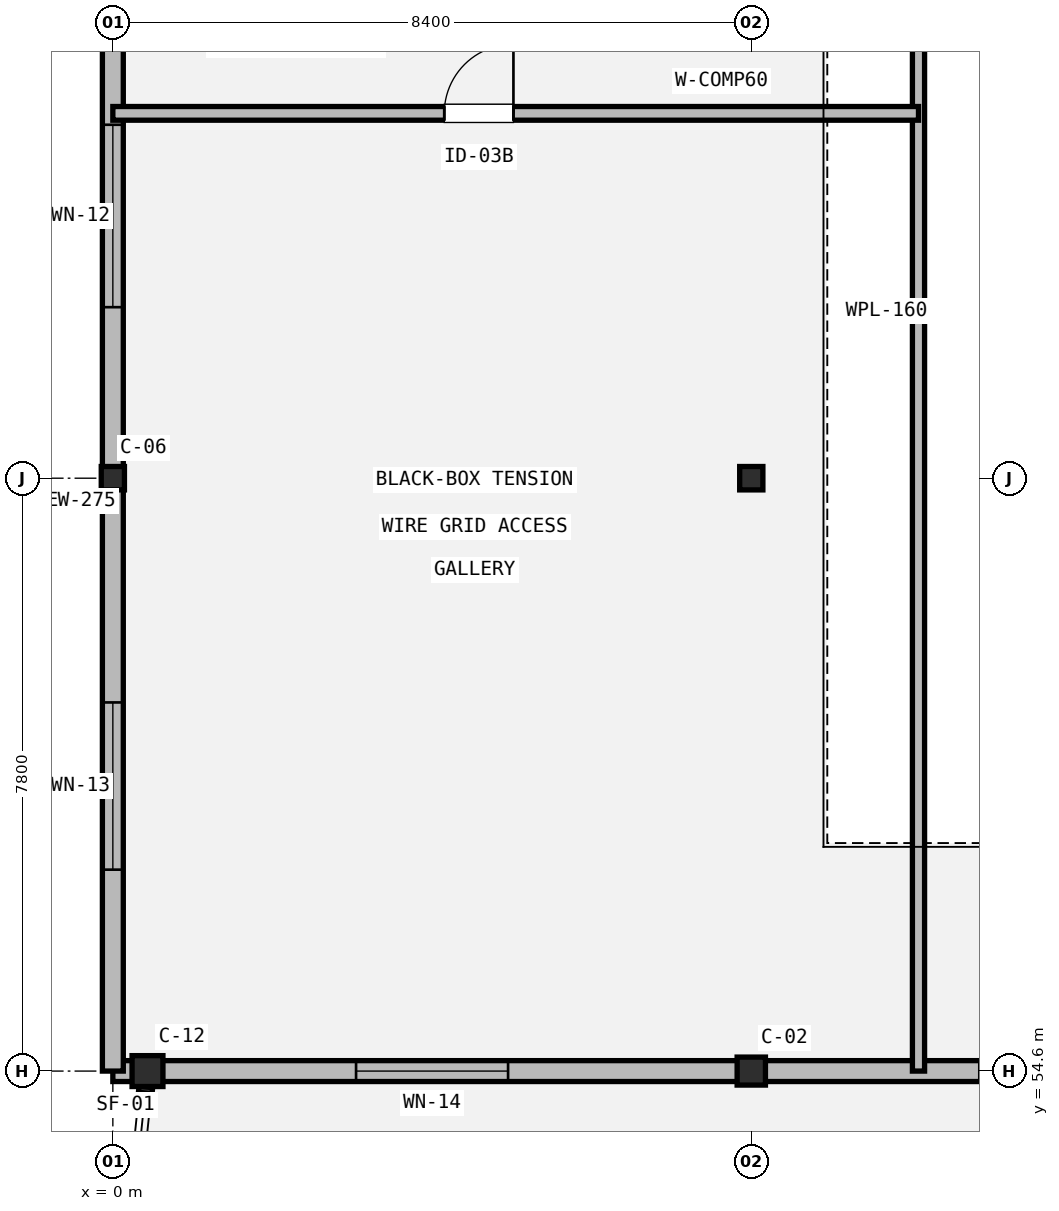
"""IFC4 building model, lengths in metres.
Left out: names, types, materials, properties, quantities, classifications, styles, units other than length and angle.
Written with IfcOpenShell. Run it as: python <this file> out.ifc"""

import sys

from ifc_helpers import new_model, si_unit, direction, frame, frame_2d, origin, origin_2d, place, context, subcontext, project, spatial, rectangle, hollow_circle, i_section, extrude, element, fill, save


model = new_model("IFC4")
c1 = context("Model", 3, precision=1e-05, world=origin(), true_north=direction((0.0, 1.0)))
c2 = subcontext(c1, "Body", "Model", "MODEL_VIEW")
j1 = project(units=[si_unit("LENGTHUNIT", "METRE"), si_unit("PLANEANGLEUNIT", "RADIAN")], contexts=[c1])
p1 = place(None, origin())
s1 = spatial("IfcSite", under=j1, at=p1, CompositionType="ELEMENT")
p2 = place(p1, origin())
s2 = spatial("IfcBuilding", under=s1, at=p2, CompositionType="ELEMENT")
p3 = place(p2, frame((0.0, 0.0, 10.2)))
s3 = spatial("IfcBuildingStorey", under=s2, at=p3, CompositionType="ELEMENT", Elevation=10.2)
p4 = place(p3, frame((8.4, 54.6, 0.0), z_axis=(0.0, 0.0, 1.0), x_axis=(1.0, 0.0, 0.0)))
e1 = element("IfcColumn", 1, at=p4, inside=s3, PredefinedType="COLUMN", context=c2, shape_type="SweptSolid", body=[
    extrude(i_section(OverallWidth=0.373, OverallDepth=0.368, WebThickness=0.014, FlangeThickness=0.024, FilletRadius=0.015, at=origin_2d()), origin(), (0.0, 0.0, 1.0), 4.8),
])
p5 = place(p3, frame((0.456, 54.6, 0.0), z_axis=(0.0, 0.0, 1.0), x_axis=(1.0, 0.0, 0.0)))
e2 = element("IfcColumn", 2, at=p5, inside=s3, PredefinedType="COLUMN", context=c2, shape_type="SweptSolid", body=[
    extrude(hollow_circle(Radius=0.203, WallThickness=0.016, at=origin_2d()), origin(), (0.0, 0.0, 1.0), 4.8),
])
for number, where, z_axis, x_axis in (
    (3, (0.0, 62.4, 0.0), (0.0, 0.0, 1.0), (1.0, 0.0, 0.0)),
    (4, (8.4, 62.4, 0.0), (0.0, 0.0, 1.0), (1.0, 0.0, 0.0)),
):
    element("IfcColumn", number, at=place(p3, frame(where, z_axis=z_axis, x_axis=x_axis)), inside=s3, PredefinedType="COLUMN", context=c2, shape_type="SweptSolid", body=[
        extrude(i_section(OverallWidth=0.305, OverallDepth=0.308, WebThickness=0.01, FlangeThickness=0.015, FilletRadius=0.015, at=origin_2d()), origin(), (0.0, 0.0, 1.0), 4.8),
    ])
p6 = place(p3, frame((25.2, 54.6, 0.0), z_axis=(0.0, 0.0, 1.0), x_axis=(-1.0, 0.0, 0.0)))
e5 = element("IfcWall", 5, at=p6, inside=s3, PredefinedType="STANDARD", context=c2, shape_type="SweptSolid", body=[
    extrude(rectangle(XDim=25.2, YDim=0.275, at=frame_2d((12.6, 0.0))), origin(), (0.0, 0.0, 1.0), 4.032),
])
p7 = place(p6, frame((3.075, 0.0, 0.9)))
e6 = element("IfcOpeningElement", 6, at=p7, cuts=e5, PredefinedType="OPENING", context=c2, shape_type="SweptSolid", body=[
    extrude(rectangle(XDim=0.9, YDim=1.35, at=frame_2d((0.45, 0.675))), frame((0.0, 0.147, 0.0), z_axis=(0.0, -1.0, 0.0), x_axis=(1.0, 0.0, 0.0)), (0.0, 0.0, 1.0), 0.295),
])
p8 = place(p6, frame((11.4, 0.0, 0.9)))
e7 = element("IfcOpeningElement", 7, at=p8, cuts=e5, PredefinedType="OPENING", context=c2, shape_type="SweptSolid", body=[
    extrude(rectangle(XDim=2.4, YDim=1.8, at=frame_2d((1.2, 0.9))), frame((0.0, 0.147, 0.0), z_axis=(0.0, -1.0, 0.0), x_axis=(1.0, 0.0, 0.0)), (0.0, 0.0, 1.0), 0.295),
])
p9 = place(p6, frame((20.0, 0.0, 0.9)))
e8 = element("IfcOpeningElement", 8, at=p9, cuts=e5, PredefinedType="OPENING", context=c2, shape_type="SweptSolid", body=[
    extrude(rectangle(XDim=2.0, YDim=1.1, at=frame_2d((1.0, 0.55))), frame((0.0, 0.147, 0.0), z_axis=(0.0, -1.0, 0.0), x_axis=(1.0, 0.0, 0.0)), (0.0, 0.0, 1.0), 0.295),
])
p10 = place(p3, frame((0.0, 54.6, 0.0), z_axis=(0.0, 0.0, 1.0), x_axis=(0.0, 1.0, 0.0)))
e9 = element("IfcWall", 9, at=p10, inside=s3, PredefinedType="STANDARD", context=c2, shape_type="SweptSolid", body=[
    extrude(rectangle(XDim=15.0, YDim=0.275, at=frame_2d((7.5, 0.0))), origin(), (0.0, 0.0, 1.0), 4.032),
])
p11 = place(p10, frame((2.65, 0.0, 0.9)))
e10 = element("IfcOpeningElement", 10, at=p11, cuts=e9, PredefinedType="OPENING", context=c2, shape_type="SweptSolid", body=[
    extrude(rectangle(XDim=2.2, YDim=1.15, at=frame_2d((1.1, 0.575))), frame((0.0, 0.147, 0.0), z_axis=(0.0, -1.0, 0.0), x_axis=(1.0, 0.0, 0.0)), (0.0, 0.0, 1.0), 0.295),
])
p12 = place(p10, frame((10.05, 0.0, 0.9)))
e11 = element("IfcOpeningElement", 11, at=p12, cuts=e9, PredefinedType="OPENING", context=c2, shape_type="SweptSolid", body=[
    extrude(rectangle(XDim=2.4, YDim=1.15, at=frame_2d((1.2, 0.575))), frame((0.0, 0.147, 0.0), z_axis=(0.0, -1.0, 0.0), x_axis=(1.0, 0.0, 0.0)), (0.0, 0.0, 1.0), 0.295),
])
p13 = place(p3, frame((10.6, 54.6, 0.0), z_axis=(0.0, 0.0, 1.0), x_axis=(0.0, 1.0, 0.0)))
e12 = element("IfcWall", 12, at=p13, inside=s3, PredefinedType="PLUMBINGWALL", context=c2, shape_type="SweptSolid", body=[
    extrude(rectangle(XDim=32.4, YDim=0.16, at=frame_2d((16.2, 0.0))), origin(), (0.0, 0.0, 1.0), 3.564),
])
p14 = place(p13, frame((25.502, 0.0, 0.0)))
e13 = element("IfcOpeningElement", 13, at=p14, cuts=e12, PredefinedType="OPENING", context=c2, shape_type="SweptSolid", body=[
    extrude(rectangle(XDim=1.3, YDim=2.2, at=frame_2d((0.65, 1.1))), frame((0.0, 0.09, 0.0), z_axis=(0.0, -1.0, 0.0), x_axis=(1.0, 0.0, 0.0)), (0.0, 0.0, 1.0), 0.18),
])
p15 = place(p3, frame((0.0, 67.2, 0.0), z_axis=(0.0, 0.0, 1.0), x_axis=(1.0, 0.0, 0.0)))
e14 = element("IfcWall", 14, at=p15, inside=s3, PredefinedType="STANDARD", context=c2, shape_type="SweptSolid", body=[
    extrude(rectangle(XDim=10.6, YDim=0.18, at=frame_2d((5.3, 0.0))), origin(), (0.0, 0.0, 1.0), 4.032),
])
p16 = place(p15, frame((4.361, 0.0, 0.0)))
e15 = element("IfcOpeningElement", 15, at=p16, cuts=e14, PredefinedType="OPENING", context=c2, shape_type="SweptSolid", body=[
    extrude(rectangle(XDim=0.91, YDim=2.1, at=frame_2d((0.455, 1.05))), frame((0.0, 0.1, 0.0), z_axis=(0.0, -1.0, 0.0), x_axis=(1.0, 0.0, 0.0)), (0.0, 0.0, 1.0), 0.2),
])
p17 = place(p9, origin())
e16 = element("IfcWindow", 16, at=p17, inside=s3, PartitioningType="SINGLE_PANEL", PredefinedType="WINDOW", context=c2, shape_type="SweptSolid", body=[
    extrude(rectangle(XDim=2.0, YDim=1.1, at=frame_2d((1.0, 0.55))), frame((0.0, 0.03, 0.0), z_axis=(0.0, -1.0, 0.0), x_axis=(1.0, 0.0, 0.0)), (0.0, 0.0, 1.0), 0.06),
])
fill(e8, e16)
p18 = place(p11, origin())
e17 = element("IfcWindow", 17, at=p18, inside=s3, PartitioningType="SINGLE_PANEL", PredefinedType="WINDOW", context=c2, shape_type="SweptSolid", body=[
    extrude(rectangle(XDim=2.2, YDim=1.15, at=frame_2d((1.1, 0.575))), frame((0.0, 0.03, 0.0), z_axis=(0.0, -1.0, 0.0), x_axis=(1.0, 0.0, 0.0)), (0.0, 0.0, 1.0), 0.06),
])
fill(e10, e17)
p19 = place(p12, origin())
e18 = element("IfcWindow", 18, at=p19, inside=s3, PartitioningType="SINGLE_PANEL", PredefinedType="WINDOW", context=c2, shape_type="SweptSolid", body=[
    extrude(rectangle(XDim=2.4, YDim=1.15, at=frame_2d((1.2, 0.575))), frame((0.0, 0.03, 0.0), z_axis=(0.0, -1.0, 0.0), x_axis=(1.0, 0.0, 0.0)), (0.0, 0.0, 1.0), 0.06),
])
fill(e11, e18)
p20 = place(p16, origin())
e19 = element("IfcDoor", 19, at=p20, inside=s3, OperationType="SINGLE_SWING_RIGHT", PredefinedType="DOOR", context=c2, shape_type="SweptSolid", body=[
    extrude(rectangle(XDim=0.91, YDim=2.1, at=frame_2d((0.455, 1.05))), frame((0.0, 0.025, 0.0), z_axis=(0.0, -1.0, 0.0), x_axis=(1.0, 0.0, 0.0)), (0.0, 0.0, 1.0), 0.05),
])
fill(e15, e19)
save(model, sys.argv[1])
